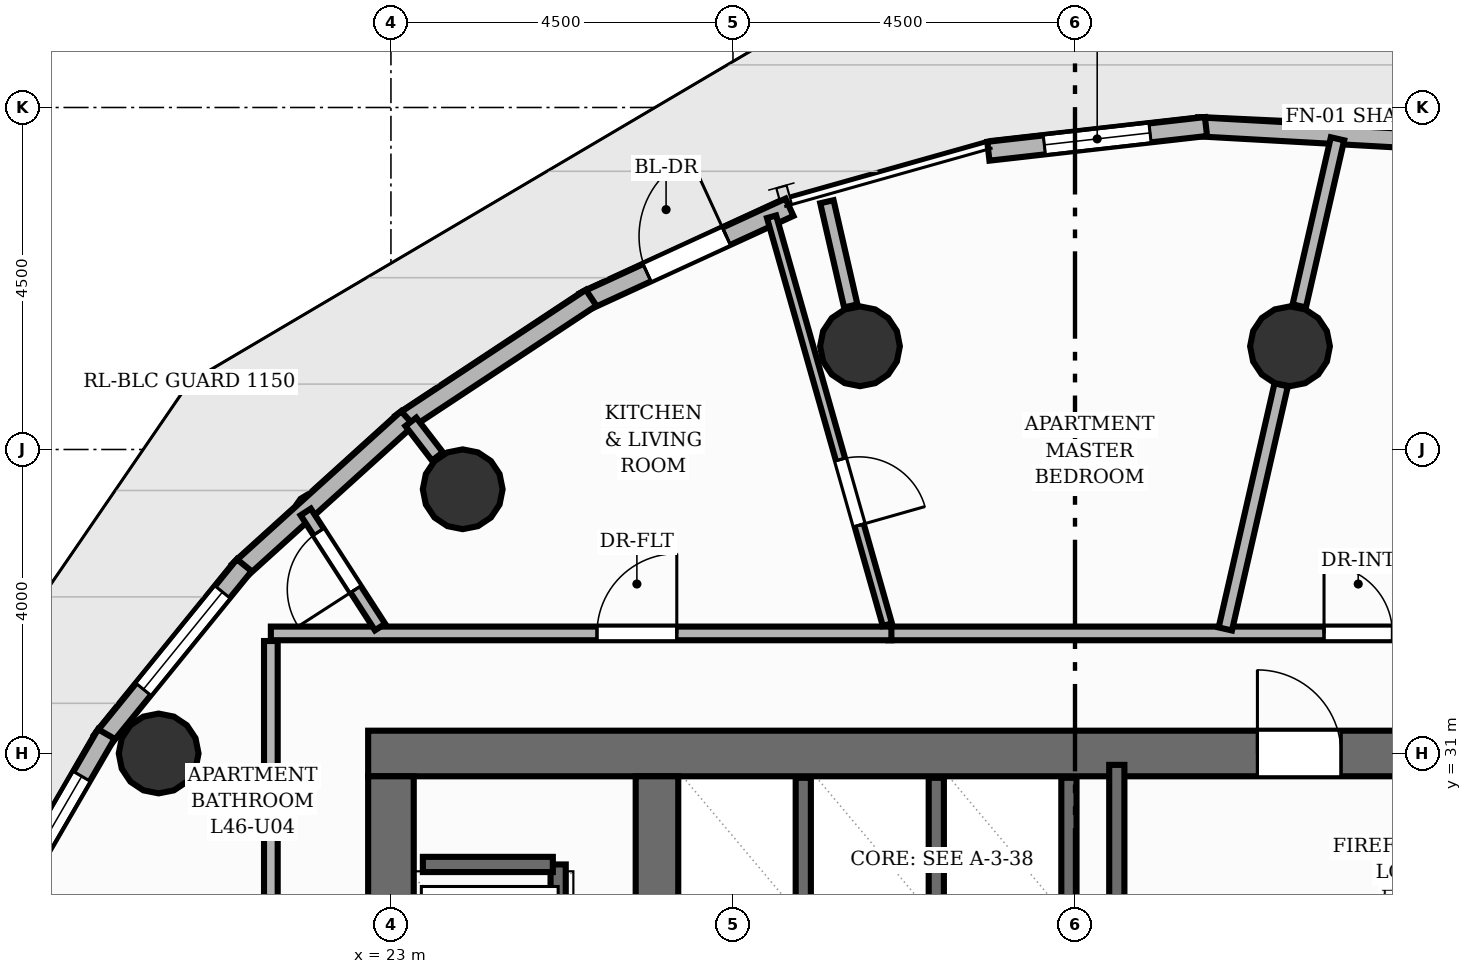
"""IFC4 building model, lengths in metres.
Left out: names, types, materials, properties, quantities, classifications, styles, units other than length and angle.
Written with IfcOpenShell. Run it as: python <this file> out.ifc"""

import sys

from ifc_helpers import new_model, si_unit, direction, frame, frame_2d, origin, origin_2d, place, context, subcontext, project, spatial, rectangle, circle, extrude, element, fill, save


model = new_model("IFC4")
c1 = context("Model", 3, precision=1e-05, world=origin(), true_north=direction((0.0, 1.0)))
c2 = subcontext(c1, "Body", "Model", "MODEL_VIEW")
j1 = project(units=[si_unit("LENGTHUNIT", "METRE"), si_unit("PLANEANGLEUNIT", "RADIAN")], contexts=[c1])
p1 = place(None, origin())
s1 = spatial("IfcSite", under=j1, at=p1, CompositionType="ELEMENT")
p2 = place(p1, origin())
s2 = spatial("IfcBuilding", under=s1, at=p2, CompositionType="ELEMENT")
p3 = place(p2, frame((0.0, 0.0, 155.36)))
s3 = spatial("IfcBuildingStorey", under=s2, at=p3, CompositionType="ELEMENT", Elevation=155.36)
p4 = place(p3, frame((22.7, 31.0, 0.0), z_axis=(0.0, 0.0, 1.0), x_axis=(1.0, 0.0, 0.0)))
e1 = element("IfcWall", 1, at=p4, inside=s3, PredefinedType="SHEAR", context=c2, shape_type="SweptSolid", body=[
    extrude(rectangle(XDim=15.1, YDim=0.6, at=frame_2d((7.55, 0.0))), origin(), (0.0, 0.0, 1.0), 3.2),
])
p5 = place(p4, frame((11.7, 0.0, 0.0)))
e2 = element("IfcOpeningElement", 2, at=p5, cuts=e1, PredefinedType="OPENING", context=c2, shape_type="SweptSolid", body=[
    extrude(rectangle(XDim=1.1, YDim=2.15, at=frame_2d((0.55, 1.075))), frame((0.0, 0.31, 0.0), z_axis=(0.0, -1.0, 0.0), x_axis=(1.0, 0.0, 0.0)), (0.0, 0.0, 1.0), 0.62),
])
p6 = place(p3, frame((23.0, 17.3, 0.0), z_axis=(0.0, 0.0, 1.0), x_axis=(0.0, 1.0, 0.0)))
e3 = element("IfcWall", 3, at=p6, inside=s3, PredefinedType="SHEAR", context=c2, shape_type="SweptSolid", body=[
    extrude(rectangle(XDim=13.4, YDim=0.6, at=frame_2d((6.7, 0.0))), origin(), (0.0, 0.0, 1.0), 3.2),
])
p7 = place(p6, frame((1.675, 0.0, 0.0)))
e4 = element("IfcOpeningElement", 4, at=p7, cuts=e3, PredefinedType="OPENING", context=c2, shape_type="SweptSolid", body=[
    extrude(rectangle(XDim=1.05, YDim=2.15, at=frame_2d((0.525, 1.075))), frame((0.0, 0.31, 0.0), z_axis=(0.0, -1.0, 0.0), x_axis=(1.0, 0.0, 0.0)), (0.0, 0.0, 1.0), 0.62),
])
p8 = place(p6, frame((6.175, 0.0, 0.0)))
e5 = element("IfcOpeningElement", 5, at=p8, cuts=e3, PredefinedType="OPENING", context=c2, shape_type="SweptSolid", body=[
    extrude(rectangle(XDim=1.05, YDim=2.15, at=frame_2d((0.525, 1.075))), frame((0.0, 0.31, 0.0), z_axis=(0.0, -1.0, 0.0), x_axis=(1.0, 0.0, 0.0)), (0.0, 0.0, 1.0), 0.62),
])
p9 = place(p6, frame((10.675, 0.0, 0.0)))
e6 = element("IfcOpeningElement", 6, at=p9, cuts=e3, PredefinedType="OPENING", context=c2, shape_type="SweptSolid", body=[
    extrude(rectangle(XDim=1.05, YDim=2.15, at=frame_2d((0.525, 1.075))), frame((0.0, 0.31, 0.0), z_axis=(0.0, -1.0, 0.0), x_axis=(1.0, 0.0, 0.0)), (0.0, 0.0, 1.0), 0.62),
])
p10 = place(p3, frame((26.5, 17.3, 0.0), z_axis=(0.0, 0.0, 1.0), x_axis=(0.0, 1.0, 0.0)))
e7 = element("IfcWall", 7, at=p10, inside=s3, PredefinedType="SHEAR", context=c2, shape_type="SweptSolid", body=[
    extrude(rectangle(XDim=13.4, YDim=0.56, at=frame_2d((6.7, 0.0))), origin(), (0.0, 0.0, 1.0), 3.2),
])
for number, where, z_axis, x_axis in (
    (8, (34.829, 36.358, 0.0), (0.0, 0.0, 1.0), (1.0, 0.0, 0.0)),
    (9, (29.171, 36.358, 0.0), (0.0, 0.0, 1.0), (1.0, 0.0, 0.0)),
    (10, (23.944, 34.477, 0.0), (0.0, 0.0, 1.0), (1.0, 0.0, 0.0)),
    (11, (19.944, 31.0, 0.0), (0.0, 0.0, 1.0), (1.0, 0.0, 0.0)),
):
    element("IfcColumn", number, at=place(p3, frame(where, z_axis=z_axis, x_axis=x_axis)), inside=s3, PredefinedType="COLUMN", context=c2, shape_type="SweptSolid", body=[
        extrude(circle(Radius=0.525, at=origin_2d()), origin(), (0.0, 0.0, 1.0), 3.2),
    ])
p11 = place(p3, frame((33.613, 39.246, 0.0), z_axis=(0.0, 0.0, 1.0), x_axis=(0.998436800423, -0.055892356906, 0.0)))
e12 = element("IfcWall", 12, at=p11, inside=s3, PredefinedType="SOLIDWALL", context=c2, shape_type="SweptSolid", body=[
    extrude(rectangle(XDim=2.817, YDim=0.25, at=frame_2d((1.409, 0.0))), origin(), (0.0, 0.0, 1.0), 2.8),
])
p12 = place(p3, frame((30.86, 38.924, 0.0), z_axis=(0.0, 0.0, 1.0), x_axis=(0.993631150985, 0.112681568111, 0.0)))
e13 = element("IfcWall", 13, at=p12, inside=s3, PredefinedType="SOLIDWALL", context=c2, shape_type="SweptSolid", body=[
    extrude(rectangle(XDim=2.882, YDim=0.25, at=frame_2d((1.441, 0.0))), origin(), (0.0, 0.0, 1.0), 2.8),
])
p13 = place(p12, frame((0.741, 0.0, 0.85)))
e14 = element("IfcOpeningElement", 14, at=p13, cuts=e13, PredefinedType="OPENING", context=c2, shape_type="SweptSolid", body=[
    extrude(rectangle(XDim=1.4, YDim=1.55, at=frame_2d((0.7, 0.775))), frame((0.0, 0.135, 0.0), z_axis=(0.0, -1.0, 0.0), x_axis=(1.0, 0.0, 0.0)), (0.0, 0.0, 1.0), 0.27),
])
p14 = place(p3, frame((25.539, 36.944, 0.0), z_axis=(0.0, 0.0, 1.0), x_axis=(0.908594420046, 0.417679518124, 0.0)))
e15 = element("IfcWall", 15, at=p14, inside=s3, PredefinedType="SOLIDWALL", context=c2, shape_type="SweptSolid", body=[
    extrude(rectangle(XDim=2.977, YDim=0.25, at=frame_2d((1.489, 0.0))), origin(), (0.0, 0.0, 1.0), 2.8),
])
p15 = place(p14, frame((0.914, 0.0, 0.0)))
e16 = element("IfcOpeningElement", 16, at=p15, cuts=e15, PredefinedType="OPENING", context=c2, shape_type="SweptSolid", body=[
    extrude(rectangle(XDim=1.15, YDim=2.2, at=frame_2d((0.575, 1.1))), frame((0.0, 0.135, 0.0), z_axis=(0.0, -1.0, 0.0), x_axis=(1.0, 0.0, 0.0)), (0.0, 0.0, 1.0), 0.27),
])
p16 = place(p3, frame((23.132, 35.344, 0.0), z_axis=(0.0, 0.0, 1.0), x_axis=(0.83436073477, 0.551218798912, 0.0)))
e17 = element("IfcWall", 17, at=p16, inside=s3, PredefinedType="SOLIDWALL", context=c2, shape_type="SweptSolid", body=[
    extrude(rectangle(XDim=2.998, YDim=0.25, at=frame_2d((1.499, 0.0))), origin(), (0.0, 0.0, 1.0), 2.8),
])
p17 = place(p3, frame((20.995, 33.398, 0.0), z_axis=(0.0, 0.0, 1.0), x_axis=(0.741367932595, 0.671098791922, 0.0)))
e18 = element("IfcWall", 18, at=p17, inside=s3, PredefinedType="SOLIDWALL", context=c2, shape_type="SweptSolid", body=[
    extrude(rectangle(XDim=2.998, YDim=0.25, at=frame_2d((1.499, 0.0))), origin(), (0.0, 0.0, 1.0), 2.8),
])
p18 = place(p3, frame((19.193, 31.167, 0.0), z_axis=(0.0, 0.0, 1.0), x_axis=(0.630478385784, 0.776206805599, 0.0)))
e19 = element("IfcWall", 19, at=p18, inside=s3, PredefinedType="SOLIDWALL", context=c2, shape_type="SweptSolid", body=[
    extrude(rectangle(XDim=2.977, YDim=0.25, at=frame_2d((1.489, 0.0))), origin(), (0.0, 0.0, 1.0), 2.8),
])
p19 = place(p18, frame((0.873, 0.0, 0.85)))
e20 = element("IfcOpeningElement", 20, at=p19, cuts=e19, PredefinedType="OPENING", context=c2, shape_type="SweptSolid", body=[
    extrude(rectangle(XDim=1.65, YDim=1.55, at=frame_2d((0.825, 0.775))), frame((0.0, 0.135, 0.0), z_axis=(0.0, -1.0, 0.0), x_axis=(1.0, 0.0, 0.0)), (0.0, 0.0, 1.0), 0.27),
])
p20 = place(p3, frame((17.781, 28.717, 0.0), z_axis=(0.0, 0.0, 1.0), x_axis=(0.502009170613, 0.864862296912, 0.0)))
e21 = element("IfcWall", 21, at=p20, inside=s3, PredefinedType="SOLIDWALL", context=c2, shape_type="SweptSolid", body=[
    extrude(rectangle(XDim=2.937, YDim=0.25, at=frame_2d((1.469, 0.0))), origin(), (0.0, 0.0, 1.0), 2.8),
])
p21 = place(p20, frame((0.643, 0.0, 0.85)))
e22 = element("IfcOpeningElement", 22, at=p21, cuts=e21, PredefinedType="OPENING", context=c2, shape_type="SweptSolid", body=[
    extrude(rectangle(XDim=1.65, YDim=1.55, at=frame_2d((0.825, 0.775))), frame((0.0, 0.135, 0.0), z_axis=(0.0, -1.0, 0.0), x_axis=(1.0, 0.0, 0.0)), (0.0, 0.0, 1.0), 0.27),
])
p22 = place(p3, frame((32.55, 27.35, 0.0), z_axis=(0.0, 0.0, 1.0), x_axis=(0.0, 1.0, 0.0)))
e23 = element("IfcWall", 23, at=p22, inside=s3, PredefinedType="SHEAR", context=c2, shape_type="SweptSolid", body=[
    extrude(rectangle(XDim=3.5, YDim=0.2, at=frame_2d((1.75, 0.0))), origin(), (0.0, 0.0, 1.0), 3.2),
])
p23 = place(p3, frame((25.2, 18.46, 0.0), z_axis=(0.0, 0.0, 1.0), x_axis=(0.0, 1.0, 0.0)))
e24 = element("IfcWall", 24, at=p23, inside=s3, PredefinedType="SHEAR", context=c2, shape_type="SweptSolid", body=[
    extrude(rectangle(XDim=11.08, YDim=0.2, at=frame_2d((5.54, 0.0))), origin(), (0.0, 0.0, 1.0), 3.2),
])
p24 = place(p3, frame((23.42, 29.54, 0.0), z_axis=(0.0, 0.0, 1.0), x_axis=(1.0, 0.0, 0.0)))
e25 = element("IfcWall", 25, at=p24, inside=s3, PredefinedType="SHEAR", context=c2, shape_type="SweptSolid", body=[
    extrude(rectangle(XDim=1.71, YDim=0.2, at=frame_2d((0.855, 0.0))), origin(), (0.0, 0.0, 1.0), 3.2),
])
for number, where, z_axis, x_axis in (
    (26, (31.92, 29.02, 0.0), (0.0, 0.0, 1.0), (0.0, 1.0, 0.0)),
    (27, (28.425, 29.02, 0.0), (0.0, 0.0, 1.0), (0.0, 1.0, 0.0)),
    (28, (30.175, 29.02, 0.0), (0.0, 0.0, 1.0), (0.0, 1.0, 0.0)),
):
    element("IfcWall", number, at=place(p3, frame(where, z_axis=z_axis, x_axis=x_axis)), inside=s3, PredefinedType="SHEAR", context=c2, shape_type="SweptSolid", body=[
        extrude(rectangle(XDim=1.66, YDim=0.2, at=frame_2d((0.83, 0.0))), origin(), (0.0, 0.0, 1.0), 3.2),
    ])
p25 = place(p3, frame((34.95, 36.889, 0.0), z_axis=(0.0, 0.0, 1.0), x_axis=(0.223104026265, 0.974794641688, 0.0)))
e29 = element("IfcWall", 29, at=p25, inside=s3, PredefinedType="PARTITIONING", context=c2, shape_type="SweptSolid", body=[
    extrude(rectangle(XDim=2.255, YDim=0.18, at=frame_2d((1.128, 0.0))), origin(), (0.0, 0.0, 1.0), 2.176),
])
p26 = place(p3, frame((29.05, 36.889, 0.0), z_axis=(0.0, 0.0, 1.0), x_axis=(-0.223121817242, 0.974790569646, 0.0)))
e30 = element("IfcWall", 30, at=p26, inside=s3, PredefinedType="PARTITIONING", context=c2, shape_type="SweptSolid", body=[
    extrude(rectangle(XDim=1.406, YDim=0.18, at=frame_2d((0.703, 0.0))), origin(), (0.0, 0.0, 1.0), 2.176),
])
p27 = place(p3, frame((23.612, 34.908, 0.0), z_axis=(0.0, 0.0, 1.0), x_axis=(-0.609608105511, 0.79270294417, 0.0)))
e31 = element("IfcWall", 31, at=p27, inside=s3, PredefinedType="PARTITIONING", context=c2, shape_type="SweptSolid", body=[
    extrude(rectangle(XDim=0.575, YDim=0.18, at=frame_2d((0.287, 0.0))), origin(), (0.0, 0.0, 1.0), 2.176),
])
p28 = place(p3, frame((29.544, 32.58, 0.0), z_axis=(0.0, 0.0, 1.0), x_axis=(1.0, 0.0, 0.0)))
e32 = element("IfcWall", 32, at=p28, inside=s3, PredefinedType="PARTITIONING", context=c2, shape_type="SweptSolid", body=[
    extrude(rectangle(XDim=9.536, YDim=0.18, at=frame_2d((4.768, 0.0))), origin(), (0.0, 0.0, 1.0), 2.795),
])
p29 = place(p28, frame((5.733, 0.0, 0.0)))
e33 = element("IfcOpeningElement", 33, at=p29, cuts=e32, PredefinedType="OPENING", context=c2, shape_type="SweptSolid", body=[
    extrude(rectangle(XDim=0.9, YDim=2.1, at=frame_2d((0.45, 1.05))), frame((0.0, 0.1, 0.0), z_axis=(0.0, -1.0, 0.0), x_axis=(1.0, 0.0, 0.0)), (0.0, 0.0, 1.0), 0.2),
])
p30 = place(p3, frame((21.42, 32.58, 0.0), z_axis=(0.0, 0.0, 1.0), x_axis=(1.0, 0.0, 0.0)))
e34 = element("IfcWall", 34, at=p30, inside=s3, PredefinedType="PARTITIONING", context=c2, shape_type="SweptSolid", body=[
    extrude(rectangle(XDim=8.165, YDim=0.18, at=frame_2d((4.082, 0.0))), origin(), (0.0, 0.0, 1.0), 2.795),
])
p31 = place(p30, frame((4.291, 0.0, 0.0)))
e35 = element("IfcOpeningElement", 35, at=p31, cuts=e34, PredefinedType="OPENING", context=c2, shape_type="SweptSolid", body=[
    extrude(rectangle(XDim=1.05, YDim=2.15, at=frame_2d((0.525, 1.075))), frame((0.0, 0.1, 0.0), z_axis=(0.0, -1.0, 0.0), x_axis=(1.0, 0.0, 0.0)), (0.0, 0.0, 1.0), 0.2),
])
p32 = place(p3, frame((21.42, 26.4, 0.0), z_axis=(0.0, 0.0, 1.0), x_axis=(0.0, 1.0, 0.0)))
e36 = element("IfcWall", 36, at=p32, inside=s3, PredefinedType="PARTITIONING", context=c2, shape_type="SweptSolid", body=[
    extrude(rectangle(XDim=6.08, YDim=0.18, at=frame_2d((3.04, 0.0))), origin(), (0.0, 0.0, 1.0), 2.795),
])
p33 = place(p3, frame((33.977, 32.638, 0.0), z_axis=(0.0, 0.0, 1.0), x_axis=(0.22319287001, 0.974774303506, 0.0)))
e37 = element("IfcWall", 37, at=p33, inside=s3, PredefinedType="PARTITIONING", context=c2, shape_type="SweptSolid", body=[
    extrude(rectangle(XDim=3.296, YDim=0.18, at=frame_2d((1.648, 0.0))), origin(), (0.0, 0.0, 1.0), 2.176),
])
p34 = place(p3, frame((22.857, 32.664, 0.0), z_axis=(0.0, 0.0, 1.0), x_axis=(-0.542638936207, 0.839966061762, 0.0)))
e38 = element("IfcWall", 38, at=p34, inside=s3, PredefinedType="PLUMBINGWALL", context=c2, shape_type="SweptSolid", body=[
    extrude(rectangle(XDim=1.802, YDim=0.16, at=frame_2d((0.901, 0.0))), origin(), (0.0, 0.0, 1.0), 2.532),
])
p35 = place(p34, frame((0.591, 0.0, 0.0)))
e39 = element("IfcOpeningElement", 39, at=p35, cuts=e38, PredefinedType="OPENING", context=c2, shape_type="SweptSolid", body=[
    extrude(rectangle(XDim=0.9, YDim=2.1, at=frame_2d((0.45, 1.05))), frame((0.0, 0.09, 0.0), z_axis=(0.0, -1.0, 0.0), x_axis=(1.0, 0.0, 0.0)), (0.0, 0.0, 1.0), 0.18),
])
p36 = place(p3, frame((28.008, 38.062, 0.0), z_axis=(0.0, 0.0, 1.0), x_axis=(0.273056222603, -0.961998076556, 0.0)))
e40 = element("IfcWall", 40, at=p36, inside=s3, PredefinedType="PARTITIONING", context=c2, shape_type="SweptSolid", body=[
    extrude(rectangle(XDim=5.579, YDim=0.125, at=frame_2d((2.79, 0.0))), origin(), (0.0, 0.0, 1.0), 2.795),
])
p37 = place(p36, frame((3.32, 0.0, 0.0)))
e41 = element("IfcOpeningElement", 41, at=p37, cuts=e40, PredefinedType="OPENING", context=c2, shape_type="SweptSolid", body=[
    extrude(rectangle(XDim=0.9, YDim=2.1, at=frame_2d((0.45, 1.05))), frame((0.0, 0.073, 0.0), z_axis=(0.0, -1.0, 0.0), x_axis=(1.0, 0.0, 0.0)), (0.0, 0.0, 1.0), 0.145),
])
p38 = place(p3, frame((21.333, 30.193, 0.0), z_axis=(0.0, 0.0, 1.0), x_axis=(-0.864719901707, 0.50225440923, 0.0)))
e42 = element("IfcWall", 42, at=p38, inside=s3, PredefinedType="PLUMBINGWALL", context=c2, shape_type="SweptSolid", body=[
    extrude(rectangle(XDim=1.09, YDim=0.16, at=frame_2d((0.545, 0.0))), origin(), (0.0, 0.0, 1.0), 2.176),
])
p39 = place(p15, origin())
e43 = element("IfcDoor", 43, at=p39, inside=s3, OperationType="SINGLE_SWING_RIGHT", PredefinedType="DOOR", context=c2, shape_type="SweptSolid", body=[
    extrude(rectangle(XDim=1.15, YDim=2.2, at=frame_2d((0.575, 1.1))), frame((0.0, 0.025, 0.0), z_axis=(0.0, -1.0, 0.0), x_axis=(1.0, 0.0, 0.0)), (0.0, 0.0, 1.0), 0.05),
])
fill(e16, e43)
p40 = place(p13, origin())
e44 = element("IfcWindow", 44, at=p40, inside=s3, PartitioningType="SINGLE_PANEL", PredefinedType="WINDOW", context=c2, shape_type="SweptSolid", body=[
    extrude(rectangle(XDim=1.4, YDim=1.55, at=frame_2d((0.7, 0.775))), frame((0.0, 0.03, 0.0), z_axis=(0.0, -1.0, 0.0), x_axis=(1.0, 0.0, 0.0)), (0.0, 0.0, 1.0), 0.06),
])
fill(e14, e44)
p41 = place(p19, origin())
e45 = element("IfcWindow", 45, at=p41, inside=s3, PartitioningType="SINGLE_PANEL", PredefinedType="WINDOW", context=c2, shape_type="SweptSolid", body=[
    extrude(rectangle(XDim=1.65, YDim=1.55, at=frame_2d((0.825, 0.775))), frame((0.0, 0.03, 0.0), z_axis=(0.0, -1.0, 0.0), x_axis=(1.0, 0.0, 0.0)), (0.0, 0.0, 1.0), 0.06),
])
fill(e20, e45)
p42 = place(p21, origin())
e46 = element("IfcWindow", 46, at=p42, inside=s3, PartitioningType="SINGLE_PANEL", PredefinedType="WINDOW", context=c2, shape_type="SweptSolid", body=[
    extrude(rectangle(XDim=1.65, YDim=1.55, at=frame_2d((0.825, 0.775))), frame((0.0, 0.03, 0.0), z_axis=(0.0, -1.0, 0.0), x_axis=(1.0, 0.0, 0.0)), (0.0, 0.0, 1.0), 0.06),
])
fill(e22, e46)
p43 = place(p5, origin())
e47 = element("IfcDoor", 47, at=p43, inside=s3, OperationType="SINGLE_SWING_LEFT", PredefinedType="DOOR", context=c2, shape_type="SweptSolid", body=[
    extrude(rectangle(XDim=1.1, YDim=2.15, at=frame_2d((0.55, 1.075))), frame((0.0, 0.025, 0.0), z_axis=(0.0, -1.0, 0.0), x_axis=(1.0, 0.0, 0.0)), (0.0, 0.0, 1.0), 0.05),
])
fill(e2, e47)
p44 = place(p29, origin())
e48 = element("IfcDoor", 48, at=p44, inside=s3, OperationType="SINGLE_SWING_LEFT", PredefinedType="DOOR", context=c2, shape_type="SweptSolid", body=[
    extrude(rectangle(XDim=0.9, YDim=2.1, at=frame_2d((0.45, 1.05))), frame((0.0, 0.025, 0.0), z_axis=(0.0, -1.0, 0.0), x_axis=(1.0, 0.0, 0.0)), (0.0, 0.0, 1.0), 0.05),
])
fill(e33, e48)
p45 = place(p31, origin())
e49 = element("IfcDoor", 49, at=p45, inside=s3, OperationType="SINGLE_SWING_RIGHT", PredefinedType="DOOR", context=c2, shape_type="SweptSolid", body=[
    extrude(rectangle(XDim=1.05, YDim=2.15, at=frame_2d((0.525, 1.075))), frame((0.0, 0.025, 0.0), z_axis=(0.0, -1.0, 0.0), x_axis=(1.0, 0.0, 0.0)), (0.0, 0.0, 1.0), 0.05),
])
fill(e35, e49)
p46 = place(p35, origin())
e50 = element("IfcDoor", 50, at=p46, inside=s3, OperationType="SINGLE_SWING_LEFT", PredefinedType="DOOR", context=c2, shape_type="SweptSolid", body=[
    extrude(rectangle(XDim=0.9, YDim=2.1, at=frame_2d((0.45, 1.05))), frame((0.0, 0.025, 0.0), z_axis=(0.0, -1.0, 0.0), x_axis=(1.0, 0.0, 0.0)), (0.0, 0.0, 1.0), 0.05),
])
fill(e39, e50)
p47 = place(p37, origin())
e51 = element("IfcDoor", 51, at=p47, inside=s3, OperationType="SINGLE_SWING_RIGHT", PredefinedType="DOOR", context=c2, shape_type="SweptSolid", body=[
    extrude(rectangle(XDim=0.9, YDim=2.1, at=frame_2d((0.45, 1.05))), frame((0.0, 0.025, 0.0), z_axis=(0.0, -1.0, 0.0), x_axis=(1.0, 0.0, 0.0)), (0.0, 0.0, 1.0), 0.05),
])
fill(e41, e51)
save(model, sys.argv[1])
